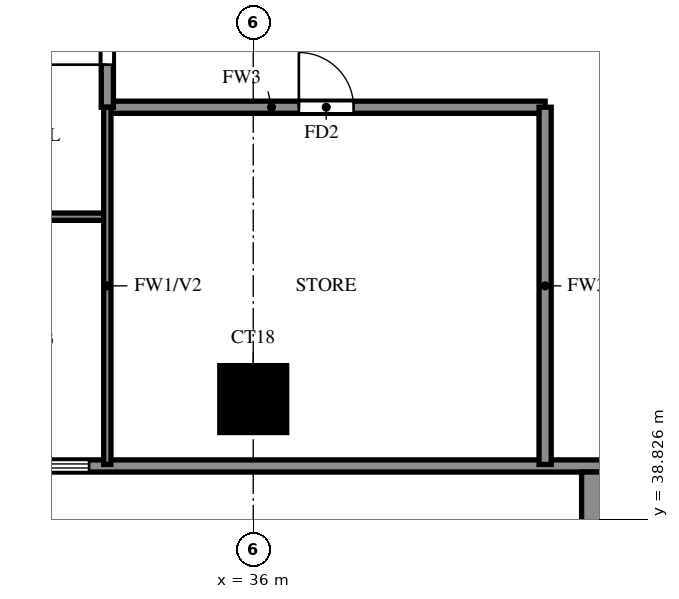
"""IFC4 building model, lengths in metres.
Left out: names, types, materials, properties, quantities, classifications, styles, units other than length and angle.
Written with IfcOpenShell. Run it as: python <this file> out.ifc"""

import sys

from ifc_helpers import new_model, si_unit, direction, frame, frame_2d, origin, origin_2d, place, context, subcontext, project, spatial, rectangle, extrude, source, transform, mapped, element, fill, save


model = new_model("IFC4")
c1 = context("Model", 3, precision=1e-05, world=origin(), true_north=direction((0.0, 1.0)))
c2 = subcontext(c1, "Body", "Model", "MODEL_VIEW")
j1 = project(units=[si_unit("LENGTHUNIT", "METRE"), si_unit("PLANEANGLEUNIT", "RADIAN")], contexts=[c1])
p1 = place(None, origin())
s1 = spatial("IfcSite", under=j1, at=p1, CompositionType="ELEMENT")
p2 = place(p1, origin())
s2 = spatial("IfcBuilding", under=s1, at=p2, CompositionType="ELEMENT")
p3 = place(p2, frame((0.0, 0.0, 113.0)))
s3 = spatial("IfcBuildingStorey", under=s2, at=p3, CompositionType="ELEMENT", Elevation=113.0)
m1 = source(origin(), c2, "Body", "SweptSolid", [
    extrude(rectangle(XDim=1.1, YDim=1.1, at=origin_2d()), origin(), (0.0, 0.0, 1.0), 3.2),
])
p4 = place(p3, frame((36.0, 40.8, 0.0), z_axis=(0.0, 0.0, 1.0), x_axis=(1.0, 0.0, 0.0)))
e1 = element("IfcColumn", 1, at=p4, inside=s3, PredefinedType="COLUMN", context=c2, shape_type="MappedRepresentation", body=[
    mapped(m1, transform((0.0, 0.0, 0.0))),
])
p5 = place(p3, frame((18.2, 39.7, 0.0), z_axis=(0.0, 0.0, 1.0), x_axis=(1.0, 0.0, 0.0)))
e2 = element("IfcWall", 2, at=p5, inside=s3, PredefinedType="SOLIDWALL", context=c2, shape_type="SweptSolid", body=[
    extrude(rectangle(XDim=23.8, YDim=0.2, at=frame_2d((11.9, 0.0))), origin(), (0.0, 0.0, 1.0), 3.2),
])
p6 = place(p5, frame((4.363, 0.0, 0.0)))
e3 = element("IfcOpeningElement", 3, at=p6, cuts=e2, PredefinedType="OPENING", context=c2, shape_type="SweptSolid", body=[
    extrude(rectangle(XDim=1.8, YDim=2.4, at=frame_2d((0.9, 1.2))), frame((0.0, 0.11, 0.0), z_axis=(0.0, -1.0, 0.0), x_axis=(1.0, 0.0, 0.0)), (0.0, 0.0, 1.0), 0.22),
])
p7 = place(p5, frame((7.9, 0.0, 0.0)))
e4 = element("IfcOpeningElement", 4, at=p7, cuts=e2, PredefinedType="OPENING", context=c2, shape_type="SweptSolid", body=[
    extrude(rectangle(XDim=1.8, YDim=2.4, at=frame_2d((0.9, 1.2))), frame((0.0, 0.11, 0.0), z_axis=(0.0, -1.0, 0.0), x_axis=(1.0, 0.0, 0.0)), (0.0, 0.0, 1.0), 0.22),
])
p8 = place(p5, frame((0.931, 0.0, 0.6)))
e5 = element("IfcOpeningElement", 5, at=p8, cuts=e2, PredefinedType="OPENING", context=c2, shape_type="SweptSolid", body=[
    extrude(rectangle(XDim=2.4, YDim=2.4, at=frame_2d((1.2, 1.2))), frame((0.0, 0.11, 0.0), z_axis=(0.0, -1.0, 0.0), x_axis=(1.0, 0.0, 0.0)), (0.0, 0.0, 1.0), 0.22),
])
p9 = place(p5, frame((10.9, 0.0, 0.6)))
e6 = element("IfcOpeningElement", 6, at=p9, cuts=e2, PredefinedType="OPENING", context=c2, shape_type="SweptSolid", body=[
    extrude(rectangle(XDim=1.2, YDim=2.4, at=frame_2d((0.6, 1.2))), frame((0.0, 0.11, 0.0), z_axis=(0.0, -1.0, 0.0), x_axis=(1.0, 0.0, 0.0)), (0.0, 0.0, 1.0), 0.22),
])
p10 = place(p5, frame((13.3, 0.0, 0.6)))
e7 = element("IfcOpeningElement", 7, at=p10, cuts=e2, PredefinedType="OPENING", context=c2, shape_type="SweptSolid", body=[
    extrude(rectangle(XDim=1.8, YDim=2.4, at=frame_2d((0.9, 1.2))), frame((0.0, 0.11, 0.0), z_axis=(0.0, -1.0, 0.0), x_axis=(1.0, 0.0, 0.0)), (0.0, 0.0, 1.0), 0.22),
])
p11 = place(p3, frame((42.3, 37.2, 0.0), z_axis=(0.0, 0.0, 1.0), x_axis=(0.0, 1.0, 0.0)))
e8 = element("IfcWall", 8, at=p11, inside=s3, PredefinedType="SOLIDWALL", context=c2, shape_type="SweptSolid", body=[
    extrude(rectangle(XDim=2.4, YDim=1.8, at=frame_2d((1.2, 0.0))), origin(), (0.0, 0.0, 1.0), 3.2),
])
p12 = place(p3, frame((33.6, 45.6, 0.0), z_axis=(0.0, 0.0, 1.0), x_axis=(1.0, 0.0, 0.0)))
e9 = element("IfcWall", 9, at=p12, inside=s3, PredefinedType="SOLIDWALL", context=c2, shape_type="SweptSolid", body=[
    extrude(rectangle(XDim=7.2, YDim=0.2, at=frame_2d((3.6, 0.0))), origin(), (0.0, 0.0, 1.0), 3.2),
])
p13 = place(p12, frame((3.15, 0.0, 0.0)))
e10 = element("IfcOpeningElement", 10, at=p13, cuts=e9, PredefinedType="OPENING", context=c2, shape_type="SweptSolid", body=[
    extrude(rectangle(XDim=0.9, YDim=2.1, at=frame_2d((0.45, 1.05))), frame((0.0, 0.11, 0.0), z_axis=(0.0, -1.0, 0.0), x_axis=(1.0, 0.0, 0.0)), (0.0, 0.0, 1.0), 0.22),
])
p14 = place(p3, frame((33.6, 45.6, 0.0), z_axis=(0.0, 0.0, 1.0), x_axis=(0.0, 1.0, 0.0)))
e11 = element("IfcWall", 11, at=p14, inside=s3, PredefinedType="SOLIDWALL", context=c2, shape_type="SweptSolid", body=[
    extrude(rectangle(XDim=12.0, YDim=0.2, at=frame_2d((6.0, 0.0))), origin(), (0.0, 0.0, 1.0), 3.2),
])
p15 = place(p14, frame((0.7, 0.0, 0.0)))
e12 = element("IfcOpeningElement", 12, at=p15, cuts=e11, PredefinedType="OPENING", context=c2, shape_type="SweptSolid", body=[
    extrude(rectangle(XDim=1.0, YDim=2.1, at=frame_2d((0.5, 1.05))), frame((0.0, 0.11, 0.0), z_axis=(0.0, -1.0, 0.0), x_axis=(1.0, 0.0, 0.0)), (0.0, 0.0, 1.0), 0.22),
])
p16 = place(p3, frame((40.8, 39.725, 0.0), z_axis=(0.0, 0.0, 1.0), x_axis=(0.0, 1.0, 0.0)))
e13 = element("IfcWall", 13, at=p16, inside=s3, PredefinedType="SOLIDWALL", context=c2, shape_type="SweptSolid", body=[
    extrude(rectangle(XDim=5.875, YDim=0.2, at=frame_2d((2.938, 0.0))), origin(), (0.0, 0.0, 1.0), 3.2),
])
p17 = place(p3, frame((25.2, 43.8, 0.0), z_axis=(0.0, 0.0, 1.0), x_axis=(1.0, 0.0, 0.0)))
e14 = element("IfcWall", 14, at=p17, inside=s3, PredefinedType="PARTITIONING", context=c2, shape_type="SweptSolid", body=[
    extrude(rectangle(XDim=8.4, YDim=0.12, at=frame_2d((4.2, 0.0))), origin(), (0.0, 0.0, 1.0), 3.2),
])
p18 = place(p17, frame((1.35, 0.0, 0.0)))
e15 = element("IfcOpeningElement", 15, at=p18, cuts=e14, PredefinedType="OPENING", context=c2, shape_type="SweptSolid", body=[
    extrude(rectangle(XDim=0.9, YDim=2.1, at=frame_2d((0.45, 1.05))), frame((0.0, 0.07, 0.0), z_axis=(0.0, -1.0, 0.0), x_axis=(1.0, 0.0, 0.0)), (0.0, 0.0, 1.0), 0.14),
])
p19 = place(p17, frame((5.55, 0.0, 0.0)))
e16 = element("IfcOpeningElement", 16, at=p19, cuts=e14, PredefinedType="OPENING", context=c2, shape_type="SweptSolid", body=[
    extrude(rectangle(XDim=0.9, YDim=2.1, at=frame_2d((0.45, 1.05))), frame((0.0, 0.07, 0.0), z_axis=(0.0, -1.0, 0.0), x_axis=(1.0, 0.0, 0.0)), (0.0, 0.0, 1.0), 0.14),
])
p20 = place(p3, frame((33.6, 39.725, 0.0), z_axis=(0.0, 0.0, 1.0), x_axis=(0.0, 1.0, 0.0)))
e17 = element("IfcWall", 17, at=p20, inside=s3, PredefinedType="PARTITIONING", context=c2, shape_type="SweptSolid", body=[
    extrude(rectangle(XDim=5.875, YDim=0.12, at=frame_2d((2.938, 0.0))), origin(), (0.0, 0.0, 1.0), 3.2),
])
p21 = place(p10, origin())
e18 = element("IfcWindow", 18, at=p21, inside=s3, PartitioningType="DOUBLE_PANEL_VERTICAL", PredefinedType="WINDOW", context=c2, shape_type="SweptSolid", body=[
    extrude(rectangle(XDim=1.8, YDim=2.4, at=frame_2d((0.9, 1.2))), frame((0.0, 0.03, 0.0), z_axis=(0.0, -1.0, 0.0), x_axis=(1.0, 0.0, 0.0)), (0.0, 0.0, 1.0), 0.06),
])
fill(e7, e18)
p22 = place(p15, origin())
e19 = element("IfcDoor", 19, at=p22, inside=s3, OperationType="SINGLE_SWING_LEFT", PredefinedType="DOOR", context=c2, shape_type="SweptSolid", body=[
    extrude(rectangle(XDim=1.0, YDim=2.1, at=frame_2d((0.5, 1.05))), frame((0.0, 0.025, 0.0), z_axis=(0.0, -1.0, 0.0), x_axis=(1.0, 0.0, 0.0)), (0.0, 0.0, 1.0), 0.05),
])
fill(e12, e19)
p23 = place(p13, origin())
e20 = element("IfcDoor", 20, at=p23, inside=s3, OperationType="SINGLE_SWING_LEFT", PredefinedType="DOOR", context=c2, shape_type="SweptSolid", body=[
    extrude(rectangle(XDim=0.9, YDim=2.1, at=frame_2d((0.45, 1.05))), frame((0.0, 0.025, 0.0), z_axis=(0.0, -1.0, 0.0), x_axis=(1.0, 0.0, 0.0)), (0.0, 0.0, 1.0), 0.05),
])
fill(e10, e20)
save(model, sys.argv[1])
